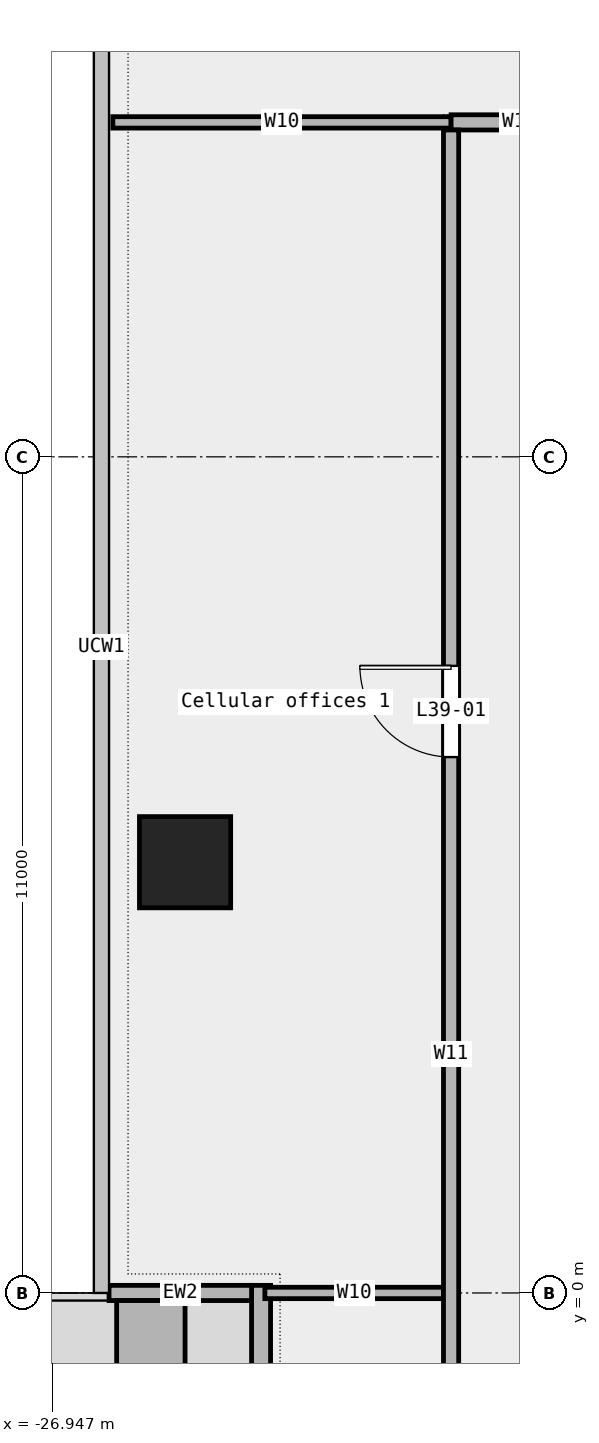
"""IFC4 building model, lengths in metres.
Left out: names, types, materials, properties, quantities, classifications, styles, units other than length and angle.
Written with IfcOpenShell. Run it as: python <this file> out.ifc"""

import sys

from ifc_helpers import new_model, si_unit, direction, frame, frame_2d, origin, origin_2d, place, context, subcontext, project, spatial, rectangle, extrude, element, fill, save


model = new_model("IFC4")
c1 = context("Model", 3, precision=1e-05, world=origin(), true_north=direction((0.0, 1.0)))
c2 = subcontext(c1, "Body", "Model", "MODEL_VIEW")
j1 = project(units=[si_unit("LENGTHUNIT", "METRE"), si_unit("PLANEANGLEUNIT", "RADIAN")], contexts=[c1])
p1 = place(None, origin())
s1 = spatial("IfcSite", under=j1, at=p1, CompositionType="ELEMENT")
p2 = place(p1, origin())
s2 = spatial("IfcBuilding", under=s1, at=p2, CompositionType="ELEMENT")
p3 = place(p2, frame((0.0, 0.0, 189.0)))
s3 = spatial("IfcBuildingStorey", under=s2, at=p3, CompositionType="ELEMENT", Elevation=189.0)
p4 = place(p3, frame((-25.2, 5.667, 0.0), z_axis=(0.0, 0.0, 1.0), x_axis=(1.0, 0.0, 0.0)))
e1 = element("IfcColumn", 1, at=p4, inside=s3, PredefinedType="COLUMN", context=c2, shape_type="SweptSolid", body=[
    extrude(rectangle(XDim=1.2, YDim=1.2, at=origin_2d()), origin(), (0.0, 0.0, 1.0), 3.6),
])
p5 = place(p3, frame((-24.2, 0.1, 0.0), z_axis=(0.0, 0.0, 1.0), x_axis=(0.0, -1.0, 0.0)))
e2 = element("IfcWall", 2, at=p5, inside=s3, PredefinedType="STANDARD", context=c2, shape_type="SweptSolid", body=[
    extrude(rectangle(XDim=12.95, YDim=0.25, at=frame_2d((6.475, 0.0))), origin(), (0.0, 0.0, 1.0), 3.6),
])
p6 = place(p5, frame((1.5, 0.0, 0.45)))
e3 = element("IfcOpeningElement", 3, at=p6, cuts=e2, PredefinedType="OPENING", context=c2, shape_type="SweptSolid", body=[
    extrude(rectangle(XDim=1.5, YDim=2.4, at=frame_2d((0.75, 1.2))), frame((0.0, 0.137, 0.0), z_axis=(0.0, -1.0, 0.0), x_axis=(1.0, 0.0, 0.0)), (0.0, 0.0, 1.0), 0.274),
])
p7 = place(p5, frame((6.75, 0.0, 0.0)))
e4 = element("IfcOpeningElement", 4, at=p7, cuts=e2, PredefinedType="OPENING", context=c2, shape_type="SweptSolid", body=[
    extrude(rectangle(XDim=1.8, YDim=2.4, at=frame_2d((0.9, 1.2))), frame((0.0, 0.137, 0.0), z_axis=(0.0, -1.0, 0.0), x_axis=(1.0, 0.0, 0.0)), (0.0, 0.0, 1.0), 0.274),
])
p8 = place(p5, frame((10.0, 0.0, 0.45)))
e5 = element("IfcOpeningElement", 5, at=p8, cuts=e2, PredefinedType="OPENING", context=c2, shape_type="SweptSolid", body=[
    extrude(rectangle(XDim=1.5, YDim=2.4, at=frame_2d((0.75, 1.2))), frame((0.0, 0.137, 0.0), z_axis=(0.0, -1.0, 0.0), x_axis=(1.0, 0.0, 0.0)), (0.0, 0.0, 1.0), 0.274),
])
p9 = place(p3, frame((-26.2, 0.0, 0.0), z_axis=(0.0, 0.0, 1.0), x_axis=(1.0, 0.0, 0.0)))
e6 = element("IfcWall", 6, at=p9, inside=s3, PredefinedType="STANDARD", context=c2, shape_type="SweptSolid", body=[
    extrude(rectangle(XDim=1.875, YDim=0.2, at=frame_2d((0.938, 0.0))), origin(), (0.0, 0.0, 1.0), 3.6),
])
p10 = place(p3, frame((-25.65, -0.1, 0.0), z_axis=(0.0, 0.0, 1.0), x_axis=(0.0, -1.0, 0.0)))
e7 = element("IfcWall", 7, at=p10, inside=s3, PredefinedType="STANDARD", context=c2, shape_type="SweptSolid", body=[
    extrude(rectangle(XDim=3.6, YDim=0.9, at=frame_2d((1.8, 0.0))), origin(), (0.0, 0.0, 1.0), 0.7),
])
p11 = place(p3, frame((-24.15, 0.0, 0.0), z_axis=(0.0, 0.0, 1.0), x_axis=(1.0, 0.0, 0.0)))
e8 = element("IfcWall", 8, at=p11, inside=s3, PredefinedType="PARTITIONING", context=c2, shape_type="SweptSolid", body=[
    extrude(rectangle(XDim=2.35, YDim=0.15, at=frame_2d((1.175, 0.0))), origin(), (0.0, 0.0, 1.0), 3.6),
])
p12 = place(p3, frame((-26.15, 15.4, 0.0), z_axis=(0.0, 0.0, 1.0), x_axis=(1.0, 0.0, 0.0)))
e9 = element("IfcWall", 9, at=p12, inside=s3, PredefinedType="PARTITIONING", context=c2, shape_type="SweptSolid", body=[
    extrude(rectangle(XDim=4.45, YDim=0.15, at=frame_2d((2.225, 0.0))), origin(), (0.0, 0.0, 1.0), 3.6),
])
p13 = place(p3, frame((-21.7, 15.4, 0.0), z_axis=(0.0, 0.0, 1.0), x_axis=(1.0, 0.0, 0.0)))
e10 = element("IfcWall", 10, at=p13, inside=s3, PredefinedType="PARTITIONING", context=c2, shape_type="SweptSolid", body=[
    extrude(rectangle(XDim=1.8, YDim=0.2, at=frame_2d((0.9, 0.0))), origin(), (0.0, 0.0, 1.0), 3.6),
])
p14 = place(p3, frame((-21.7, -9.0, 0.0), z_axis=(0.0, 0.0, 1.0), x_axis=(0.0, 1.0, 0.0)))
e11 = element("IfcWall", 11, at=p14, inside=s3, PredefinedType="PARTITIONING", context=c2, shape_type="SweptSolid", body=[
    extrude(rectangle(XDim=24.3, YDim=0.2, at=frame_2d((12.15, 0.0))), origin(), (0.0, 0.0, 1.0), 3.6),
])
p15 = place(p14, frame((16.05, 0.0, 0.0)))
e12 = element("IfcOpeningElement", 12, at=p15, cuts=e11, PredefinedType="OPENING", context=c2, shape_type="SweptSolid", body=[
    extrude(rectangle(XDim=1.2, YDim=2.1, at=frame_2d((0.6, 1.05))), frame((0.0, 0.112, 0.0), z_axis=(0.0, -1.0, 0.0), x_axis=(1.0, 0.0, 0.0)), (0.0, 0.0, 1.0), 0.224),
])
p16 = place(p15, origin())
e13 = element("IfcDoor", 13, at=p16, inside=s3, OperationType="SINGLE_SWING_RIGHT", PredefinedType="DOOR", context=c2, shape_type="SweptSolid", body=[
    extrude(rectangle(XDim=1.2, YDim=2.1, at=frame_2d((0.6, 1.05))), frame((0.0, 0.025, 0.0), z_axis=(0.0, -1.0, 0.0), x_axis=(1.0, 0.0, 0.0)), (0.0, 0.0, 1.0), 0.05),
])
fill(e12, e13)
save(model, sys.argv[1])
